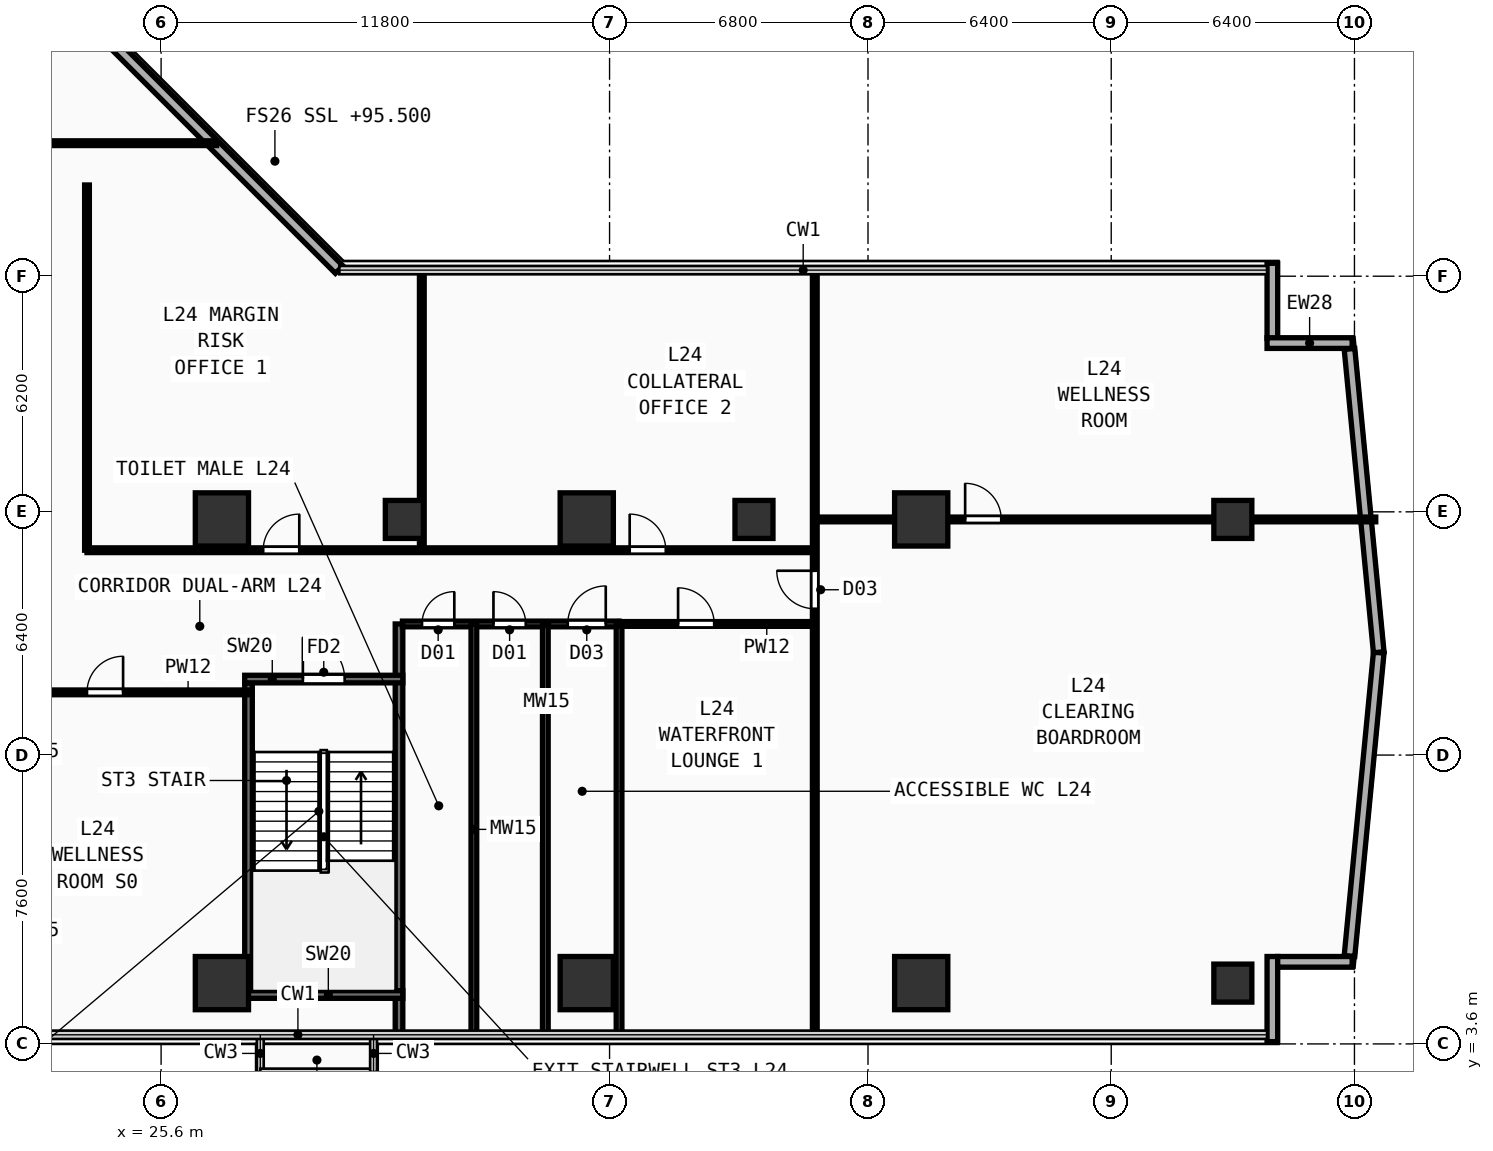
"""IFC4 building model, lengths in metres.
Left out: names, types, materials, properties, quantities, classifications, styles, units other than length and angle.
Written with IfcOpenShell. Run it as: python <this file> out.ifc"""

import sys

from ifc_helpers import new_model, si_unit, direction, frame, frame_2d, origin, origin_2d, place, context, subcontext, project, spatial, rectangle, extrude, element, fill, save


model = new_model("IFC4")
c1 = context("Model", 3, precision=1e-05, world=origin(), true_north=direction((0.0, 1.0)))
c2 = subcontext(c1, "Body", "Model", "MODEL_VIEW")
j1 = project(units=[si_unit("LENGTHUNIT", "METRE"), si_unit("PLANEANGLEUNIT", "RADIAN")], contexts=[c1])
p1 = place(None, origin())
s1 = spatial("IfcSite", under=j1, at=p1, CompositionType="ELEMENT")
p2 = place(p1, origin())
s2 = spatial("IfcBuilding", under=s1, at=p2, CompositionType="ELEMENT")
p3 = place(p2, frame((0.0, 0.0, 95.5)))
s3 = spatial("IfcBuildingStorey", under=s2, at=p3, CompositionType="ELEMENT", Elevation=95.5)
for number, where, z_axis, x_axis in (
    (1, (27.2, 5.2, 0.0), (0.0, 0.0, 1.0), (1.0, 0.0, 0.0)),
    (2, (36.8, 5.2, 0.0), (0.0, 0.0, 1.0), (1.0, 0.0, 0.0)),
    (3, (45.6, 5.2, 0.0), (0.0, 0.0, 1.0), (1.0, 0.0, 0.0)),
    (4, (27.2, 17.4, 0.0), (0.0, 0.0, 1.0), (1.0, 0.0, 0.0)),
    (5, (36.8, 17.4, 0.0), (0.0, 0.0, 1.0), (1.0, 0.0, 0.0)),
    (6, (45.6, 17.4, 0.0), (0.0, 0.0, 1.0), (1.0, 0.0, 0.0)),
):
    element("IfcColumn", number, at=place(p3, frame(where, z_axis=z_axis, x_axis=x_axis)), inside=s3, PredefinedType="COLUMN", context=c2, shape_type="SweptSolid", body=[
        extrude(rectangle(XDim=1.4, YDim=1.4, at=origin_2d()), origin(), (0.0, 0.0, 1.0), 3.54),
    ])
for number, where, z_axis, x_axis in (
    (7, (53.8, 5.2, 0.0), (0.0, 0.0, 1.0), (1.0, 0.0, 0.0)),
    (8, (53.8, 17.4, 0.0), (0.0, 0.0, 1.0), (1.0, 0.0, 0.0)),
    (9, (32.0, 17.4, 0.0), (0.0, 0.0, 1.0), (1.0, 0.0, 0.0)),
    (10, (41.2, 17.4, 0.0), (0.0, 0.0, 1.0), (1.0, 0.0, 0.0)),
):
    element("IfcColumn", number, at=place(p3, frame(where, z_axis=z_axis, x_axis=x_axis)), inside=s3, PredefinedType="COLUMN", context=c2, shape_type="SweptSolid", body=[
        extrude(rectangle(XDim=1.0, YDim=1.0, at=origin_2d()), origin(), (0.0, 0.0, 1.0), 3.54),
    ])
p4 = place(p3, frame((54.84, 3.66, 0.0), z_axis=(0.0, 0.0, 1.0), x_axis=(0.0, 1.0, 0.0)))
e11 = element("IfcWall", 11, at=p4, inside=s3, PredefinedType="SOLIDWALL", context=c2, shape_type="SweptSolid", body=[
    extrude(rectangle(XDim=2.24, YDim=0.28, at=frame_2d((1.12, 0.0))), origin(), (0.0, 0.0, 1.0), 3.54),
])
p5 = place(p3, frame((54.98, 5.76, 0.0), z_axis=(0.0, 0.0, 1.0), x_axis=(1.0, 0.0, 0.0)))
e12 = element("IfcWall", 12, at=p5, inside=s3, PredefinedType="SOLIDWALL", context=c2, shape_type="SweptSolid", body=[
    extrude(rectangle(XDim=1.96, YDim=0.28, at=frame_2d((0.98, 0.0))), origin(), (0.0, 0.0, 1.0), 3.54),
])
p6 = place(p3, frame((54.84, 22.165, 0.0), z_axis=(0.0, 0.0, 1.0), x_axis=(0.0, 1.0, 0.0)))
e13 = element("IfcWall", 13, at=p6, inside=s3, PredefinedType="SOLIDWALL", context=c2, shape_type="SweptSolid", body=[
    extrude(rectangle(XDim=1.975, YDim=0.28, at=frame_2d((0.987, 0.0))), origin(), (0.0, 0.0, 1.0), 3.54),
])
p7 = place(p3, frame((54.7, 22.04, 0.0), z_axis=(0.0, 0.0, 1.0), x_axis=(1.0, 0.0, 0.0)))
e14 = element("IfcWall", 14, at=p7, inside=s3, PredefinedType="SOLIDWALL", context=c2, shape_type="SweptSolid", body=[
    extrude(rectangle(XDim=2.24, YDim=0.28, at=frame_2d((1.12, 0.0))), origin(), (0.0, 0.0, 1.0), 3.54),
])
p8 = place(p3, frame((30.285, 23.975, 0.0), z_axis=(0.0, 0.0, 1.0), x_axis=(-0.707106781187, 0.707106781187, 0.0)))
e15 = element("IfcWall", 15, at=p8, inside=s3, PredefinedType="SOLIDWALL", context=c2, shape_type="SweptSolid", body=[
    extrude(rectangle(XDim=9.207, YDim=0.28, at=frame_2d((4.603, 0.0))), origin(), (0.0, 0.0, 1.0), 3.54),
])
for number, where, z_axis, x_axis in (
    (16, (56.869, 5.914, 0.0), (0.0, 0.0, 1.0), (0.096, 0.995, 0.0)),
    (17, (57.639, 13.905, 0.0), (0.0, 0.0, 1.0), (-0.096, 0.995, 0.0)),
):
    element("IfcWall", number, at=place(p3, frame(where, z_axis=z_axis, x_axis=x_axis)), inside=s3, PredefinedType="SOLIDWALL", context=c2, shape_type="SweptSolid", body=[
        extrude(rectangle(XDim=8.019, YDim=0.28, at=frame_2d((4.009, 0.0))), origin(), (0.0, 0.0, 1.0), 3.54),
    ])
p9 = place(p3, frame((27.9, 5.0, 0.0), z_axis=(0.0, 0.0, 1.0), x_axis=(0.0, 1.0, 0.0)))
e18 = element("IfcWall", 18, at=p9, inside=s3, PredefinedType="SHEAR", context=c2, shape_type="SweptSolid", body=[
    extrude(rectangle(XDim=8.1, YDim=0.2, at=frame_2d((4.05, 0.0))), origin(), (0.0, 0.0, 1.0), 3.54),
])
p10 = place(p3, frame((31.86, 3.84, 0.0), z_axis=(0.0, 0.0, 1.0), x_axis=(0.0, 1.0, 0.0)))
e19 = element("IfcWall", 19, at=p10, inside=s3, PredefinedType="SHEAR", context=c2, shape_type="SweptSolid", body=[
    extrude(rectangle(XDim=10.81, YDim=0.2, at=frame_2d((5.405, 0.0))), origin(), (0.0, 0.0, 1.0), 3.54),
])
p11 = place(p3, frame((27.8, 4.9, 0.0), z_axis=(0.0, 0.0, 1.0), x_axis=(1.0, 0.0, 0.0)))
e20 = element("IfcWall", 20, at=p11, inside=s3, PredefinedType="SHEAR", context=c2, shape_type="SweptSolid", body=[
    extrude(rectangle(XDim=4.16, YDim=0.2, at=frame_2d((2.08, 0.0))), origin(), (0.0, 0.0, 1.0), 3.54),
])
p12 = place(p3, frame((27.8, 13.2, 0.0), z_axis=(0.0, 0.0, 1.0), x_axis=(1.0, 0.0, 0.0)))
e21 = element("IfcWall", 21, at=p12, inside=s3, PredefinedType="SHEAR", context=c2, shape_type="SweptSolid", body=[
    extrude(rectangle(XDim=4.16, YDim=0.2, at=frame_2d((2.08, 0.0))), origin(), (0.0, 0.0, 1.0), 3.54),
])
p13 = place(p12, frame((1.53, 0.0, 0.0)))
e22 = element("IfcOpeningElement", 22, at=p13, cuts=e21, PredefinedType="OPENING", context=c2, shape_type="SweptSolid", body=[
    extrude(rectangle(XDim=1.1, YDim=2.2, at=frame_2d((0.55, 1.1))), frame((0.0, 0.11, 0.0), z_axis=(0.0, -1.0, 0.0), x_axis=(1.0, 0.0, 0.0)), (0.0, 0.0, 1.0), 0.22),
])
p14 = place(p3, frame((31.95, 14.65, 0.0), z_axis=(0.0, 0.0, 1.0), x_axis=(1.0, 0.0, 0.0)))
e23 = element("IfcWall", 23, at=p14, inside=s3, PredefinedType="PLUMBINGWALL", context=c2, shape_type="SweptSolid", body=[
    extrude(rectangle(XDim=5.7, YDim=0.15, at=frame_2d((2.85, 0.0))), origin(), (0.0, 0.0, 1.0), 3.54),
])
p15 = place(p14, frame((0.515, 0.0, 0.0)))
e24 = element("IfcOpeningElement", 24, at=p15, cuts=e23, PredefinedType="OPENING", context=c2, shape_type="SweptSolid", body=[
    extrude(rectangle(XDim=0.85, YDim=2.15, at=frame_2d((0.425, 1.075))), frame((0.0, 0.085, 0.0), z_axis=(0.0, -1.0, 0.0), x_axis=(1.0, 0.0, 0.0)), (0.0, 0.0, 1.0), 0.17),
])
p16 = place(p14, frame((2.395, 0.0, 0.0)))
e25 = element("IfcOpeningElement", 25, at=p16, cuts=e23, PredefinedType="OPENING", context=c2, shape_type="SweptSolid", body=[
    extrude(rectangle(XDim=0.85, YDim=2.15, at=frame_2d((0.425, 1.075))), frame((0.0, 0.085, 0.0), z_axis=(0.0, -1.0, 0.0), x_axis=(1.0, 0.0, 0.0)), (0.0, 0.0, 1.0), 0.17),
])
p17 = place(p14, frame((4.35, 0.0, 0.0)))
e26 = element("IfcOpeningElement", 26, at=p17, cuts=e23, PredefinedType="OPENING", context=c2, shape_type="SweptSolid", body=[
    extrude(rectangle(XDim=1.0, YDim=2.2, at=frame_2d((0.5, 1.1))), frame((0.0, 0.085, 0.0), z_axis=(0.0, -1.0, 0.0), x_axis=(1.0, 0.0, 0.0)), (0.0, 0.0, 1.0), 0.17),
])
for number, where, z_axis, x_axis in (
    (27, (33.83, 3.84, 0.0), (0.0, 0.0, 1.0), (0.0, 1.0, 0.0)),
    (28, (35.71, 3.84, 0.0), (0.0, 0.0, 1.0), (0.0, 1.0, 0.0)),
    (29, (37.65, 3.84, 0.0), (0.0, 0.0, 1.0), (0.0, 1.0, 0.0)),
):
    element("IfcWall", number, at=place(p3, frame(where, z_axis=z_axis, x_axis=x_axis)), inside=s3, PredefinedType="PLUMBINGWALL", context=c2, shape_type="SweptSolid", body=[
        extrude(rectangle(XDim=10.81, YDim=0.15, at=frame_2d((5.405, 0.0))), origin(), (0.0, 0.0, 1.0), 3.54),
    ])
p18 = place(p3, frame((20.85, 12.85, 0.0), z_axis=(0.0, 0.0, 1.0), x_axis=(1.0, 0.0, 0.0)))
e30 = element("IfcWall", 30, at=p18, inside=s3, PredefinedType="PARTITIONING", context=c2, shape_type="SweptSolid", body=[
    extrude(rectangle(XDim=7.05, YDim=0.125, at=frame_2d((3.525, 0.0))), origin(), (0.0, 0.0, 1.0), 3.54),
])
p19 = place(p18, frame((2.8, 0.0, 0.0)))
e31 = element("IfcOpeningElement", 31, at=p19, cuts=e30, PredefinedType="OPENING", context=c2, shape_type="SweptSolid", body=[
    extrude(rectangle(XDim=0.95, YDim=2.15, at=frame_2d((0.475, 1.075))), frame((0.0, 0.073, 0.0), z_axis=(0.0, -1.0, 0.0), x_axis=(1.0, 0.0, 0.0)), (0.0, 0.0, 1.0), 0.145),
])
p20 = place(p3, frame((37.65, 14.65, 0.0), z_axis=(0.0, 0.0, 1.0), x_axis=(1.0, 0.0, 0.0)))
e32 = element("IfcWall", 32, at=p20, inside=s3, PredefinedType="PARTITIONING", context=c2, shape_type="SweptSolid", body=[
    extrude(rectangle(XDim=5.15, YDim=0.125, at=frame_2d((2.575, 0.0))), origin(), (0.0, 0.0, 1.0), 3.54),
])
p21 = place(p20, frame((1.553, 0.0, 0.0)))
e33 = element("IfcOpeningElement", 33, at=p21, cuts=e32, PredefinedType="OPENING", context=c2, shape_type="SweptSolid", body=[
    extrude(rectangle(XDim=0.95, YDim=2.15, at=frame_2d((0.475, 1.075))), frame((0.0, 0.073, 0.0), z_axis=(0.0, -1.0, 0.0), x_axis=(1.0, 0.0, 0.0)), (0.0, 0.0, 1.0), 0.145),
])
p22 = place(p3, frame((42.8, 3.84, 0.0), z_axis=(0.0, 0.0, 1.0), x_axis=(0.0, 1.0, 0.0)))
e34 = element("IfcWall", 34, at=p22, inside=s3, PredefinedType="PARTITIONING", context=c2, shape_type="SweptSolid", body=[
    extrude(rectangle(XDim=20.12, YDim=0.125, at=frame_2d((10.06, 0.0))), origin(), (0.0, 0.0, 1.0), 3.54),
])
p23 = place(p22, frame((11.21, 0.0, 0.0)))
e35 = element("IfcOpeningElement", 35, at=p23, cuts=e34, PredefinedType="OPENING", context=c2, shape_type="SweptSolid", body=[
    extrude(rectangle(XDim=1.0, YDim=2.2, at=frame_2d((0.5, 1.1))), frame((0.0, 0.073, 0.0), z_axis=(0.0, -1.0, 0.0), x_axis=(1.0, 0.0, 0.0)), (0.0, 0.0, 1.0), 0.145),
])
p24 = place(p3, frame((42.8, 17.4, 0.0), z_axis=(0.0, 0.0, 1.0), x_axis=(1.0, 0.0, 0.0)))
e36 = element("IfcWall", 36, at=p24, inside=s3, PredefinedType="PARTITIONING", context=c2, shape_type="SweptSolid", body=[
    extrude(rectangle(XDim=14.76, YDim=0.125, at=frame_2d((7.38, 0.0))), origin(), (0.0, 0.0, 1.0), 3.24),
])
p25 = place(p24, frame((3.956, 0.0, 0.0)))
e37 = element("IfcOpeningElement", 37, at=p25, cuts=e36, PredefinedType="OPENING", context=c2, shape_type="SweptSolid", body=[
    extrude(rectangle(XDim=0.95, YDim=2.15, at=frame_2d((0.475, 1.075))), frame((0.0, 0.073, 0.0), z_axis=(0.0, -1.0, 0.0), x_axis=(1.0, 0.0, 0.0)), (0.0, 0.0, 1.0), 0.145),
])
p26 = place(p3, frame((23.65, 16.59, 0.0), z_axis=(0.0, 0.0, 1.0), x_axis=(0.0, 1.0, 0.0)))
e38 = element("IfcWall", 38, at=p26, inside=s3, PredefinedType="PARTITIONING", context=c2, shape_type="SweptSolid", body=[
    extrude(rectangle(XDim=9.61, YDim=0.125, at=frame_2d((4.805, 0.0))), origin(), (0.0, 0.0, 1.0), 3.54),
])
p27 = place(p3, frame((23.65, 16.59, 0.0), z_axis=(0.0, 0.0, 1.0), x_axis=(1.0, 0.0, 0.0)))
e39 = element("IfcWall", 39, at=p27, inside=s3, PredefinedType="PARTITIONING", context=c2, shape_type="SweptSolid", body=[
    extrude(rectangle(XDim=19.15, YDim=0.125, at=frame_2d((9.575, 0.0))), origin(), (0.0, 0.0, 1.0), 3.54),
])
p28 = place(p27, frame((4.636, 0.0, 0.0)))
e40 = element("IfcOpeningElement", 40, at=p28, cuts=e39, PredefinedType="OPENING", context=c2, shape_type="SweptSolid", body=[
    extrude(rectangle(XDim=0.95, YDim=2.15, at=frame_2d((0.475, 1.075))), frame((0.0, 0.073, 0.0), z_axis=(0.0, -1.0, 0.0), x_axis=(1.0, 0.0, 0.0)), (0.0, 0.0, 1.0), 0.145),
])
p29 = place(p27, frame((14.28, 0.0, 0.0)))
e41 = element("IfcOpeningElement", 41, at=p29, cuts=e39, PredefinedType="OPENING", context=c2, shape_type="SweptSolid", body=[
    extrude(rectangle(XDim=0.95, YDim=2.15, at=frame_2d((0.475, 1.075))), frame((0.0, 0.073, 0.0), z_axis=(0.0, -1.0, 0.0), x_axis=(1.0, 0.0, 0.0)), (0.0, 0.0, 1.0), 0.145),
])
p30 = place(p3, frame((32.46, 16.59, 0.0), z_axis=(0.0, 0.0, 1.0), x_axis=(0.0, 1.0, 0.0)))
e42 = element("IfcWall", 42, at=p30, inside=s3, PredefinedType="PARTITIONING", context=c2, shape_type="SweptSolid", body=[
    extrude(rectangle(XDim=7.37, YDim=0.125, at=frame_2d((3.685, 0.0))), origin(), (0.0, 0.0, 1.0), 3.54),
])
p31 = place(p3, frame((17.74, 27.3, 0.0), z_axis=(0.0, 0.0, 1.0), x_axis=(1.0, 0.0, 0.0)))
e43 = element("IfcWall", 43, at=p31, inside=s3, PredefinedType="PARTITIONING", context=c2, shape_type="SweptSolid", body=[
    extrude(rectangle(XDim=9.32, YDim=0.125, at=frame_2d((4.66, 0.0))), origin(), (0.0, 0.0, 1.0), 3.54),
])
p32 = place(p13, frame((1.1, 0.0, 0.0), z_axis=(0.0, 0.0, 1.0), x_axis=(-1.0, 0.0, 0.0)))
e44 = element("IfcDoor", 44, at=p32, inside=s3, OperationType="SINGLE_SWING_RIGHT", PredefinedType="DOOR", context=c2, shape_type="SweptSolid", body=[
    extrude(rectangle(XDim=1.1, YDim=2.2, at=frame_2d((0.55, 1.1))), frame((0.0, 0.025, 0.0), z_axis=(0.0, -1.0, 0.0), x_axis=(1.0, 0.0, 0.0)), (0.0, 0.0, 1.0), 0.05),
])
fill(e22, e44)
p33 = place(p15, origin())
e45 = element("IfcDoor", 45, at=p33, inside=s3, OperationType="SINGLE_SWING_RIGHT", PredefinedType="DOOR", context=c2, shape_type="SweptSolid", body=[
    extrude(rectangle(XDim=0.85, YDim=2.15, at=frame_2d((0.425, 1.075))), frame((0.0, 0.025, 0.0), z_axis=(0.0, -1.0, 0.0), x_axis=(1.0, 0.0, 0.0)), (0.0, 0.0, 1.0), 0.05),
])
fill(e24, e45)
p34 = place(p16, origin())
e46 = element("IfcDoor", 46, at=p34, inside=s3, OperationType="SINGLE_SWING_LEFT", PredefinedType="DOOR", context=c2, shape_type="SweptSolid", body=[
    extrude(rectangle(XDim=0.85, YDim=2.15, at=frame_2d((0.425, 1.075))), frame((0.0, 0.025, 0.0), z_axis=(0.0, -1.0, 0.0), x_axis=(1.0, 0.0, 0.0)), (0.0, 0.0, 1.0), 0.05),
])
fill(e25, e46)
p35 = place(p17, origin())
e47 = element("IfcDoor", 47, at=p35, inside=s3, OperationType="SINGLE_SWING_RIGHT", PredefinedType="DOOR", context=c2, shape_type="SweptSolid", body=[
    extrude(rectangle(XDim=1.0, YDim=2.2, at=frame_2d((0.5, 1.1))), frame((0.0, 0.025, 0.0), z_axis=(0.0, -1.0, 0.0), x_axis=(1.0, 0.0, 0.0)), (0.0, 0.0, 1.0), 0.05),
])
fill(e26, e47)
p36 = place(p19, origin())
e48 = element("IfcDoor", 48, at=p36, inside=s3, OperationType="SINGLE_SWING_RIGHT", PredefinedType="DOOR", context=c2, shape_type="SweptSolid", body=[
    extrude(rectangle(XDim=0.95, YDim=2.15, at=frame_2d((0.475, 1.075))), frame((0.0, 0.025, 0.0), z_axis=(0.0, -1.0, 0.0), x_axis=(1.0, 0.0, 0.0)), (0.0, 0.0, 1.0), 0.05),
])
fill(e31, e48)
p37 = place(p21, origin())
e49 = element("IfcDoor", 49, at=p37, inside=s3, OperationType="SINGLE_SWING_LEFT", PredefinedType="DOOR", context=c2, shape_type="SweptSolid", body=[
    extrude(rectangle(XDim=0.95, YDim=2.15, at=frame_2d((0.475, 1.075))), frame((0.0, 0.025, 0.0), z_axis=(0.0, -1.0, 0.0), x_axis=(1.0, 0.0, 0.0)), (0.0, 0.0, 1.0), 0.05),
])
fill(e33, e49)
p38 = place(p23, origin())
e50 = element("IfcDoor", 50, at=p38, inside=s3, OperationType="SINGLE_SWING_RIGHT", PredefinedType="DOOR", context=c2, shape_type="SweptSolid", body=[
    extrude(rectangle(XDim=1.0, YDim=2.2, at=frame_2d((0.5, 1.1))), frame((0.0, 0.025, 0.0), z_axis=(0.0, -1.0, 0.0), x_axis=(1.0, 0.0, 0.0)), (0.0, 0.0, 1.0), 0.05),
])
fill(e35, e50)
p39 = place(p25, origin())
e51 = element("IfcDoor", 51, at=p39, inside=s3, OperationType="SINGLE_SWING_LEFT", PredefinedType="DOOR", context=c2, shape_type="SweptSolid", body=[
    extrude(rectangle(XDim=0.95, YDim=2.15, at=frame_2d((0.475, 1.075))), frame((0.0, 0.025, 0.0), z_axis=(0.0, -1.0, 0.0), x_axis=(1.0, 0.0, 0.0)), (0.0, 0.0, 1.0), 0.05),
])
fill(e37, e51)
p40 = place(p28, origin())
e52 = element("IfcDoor", 52, at=p40, inside=s3, OperationType="SINGLE_SWING_RIGHT", PredefinedType="DOOR", context=c2, shape_type="SweptSolid", body=[
    extrude(rectangle(XDim=0.95, YDim=2.15, at=frame_2d((0.475, 1.075))), frame((0.0, 0.025, 0.0), z_axis=(0.0, -1.0, 0.0), x_axis=(1.0, 0.0, 0.0)), (0.0, 0.0, 1.0), 0.05),
])
fill(e40, e52)
p41 = place(p29, origin())
e53 = element("IfcDoor", 53, at=p41, inside=s3, OperationType="SINGLE_SWING_LEFT", PredefinedType="DOOR", context=c2, shape_type="SweptSolid", body=[
    extrude(rectangle(XDim=0.95, YDim=2.15, at=frame_2d((0.475, 1.075))), frame((0.0, 0.025, 0.0), z_axis=(0.0, -1.0, 0.0), x_axis=(1.0, 0.0, 0.0)), (0.0, 0.0, 1.0), 0.05),
])
fill(e41, e53)
save(model, sys.argv[1])
